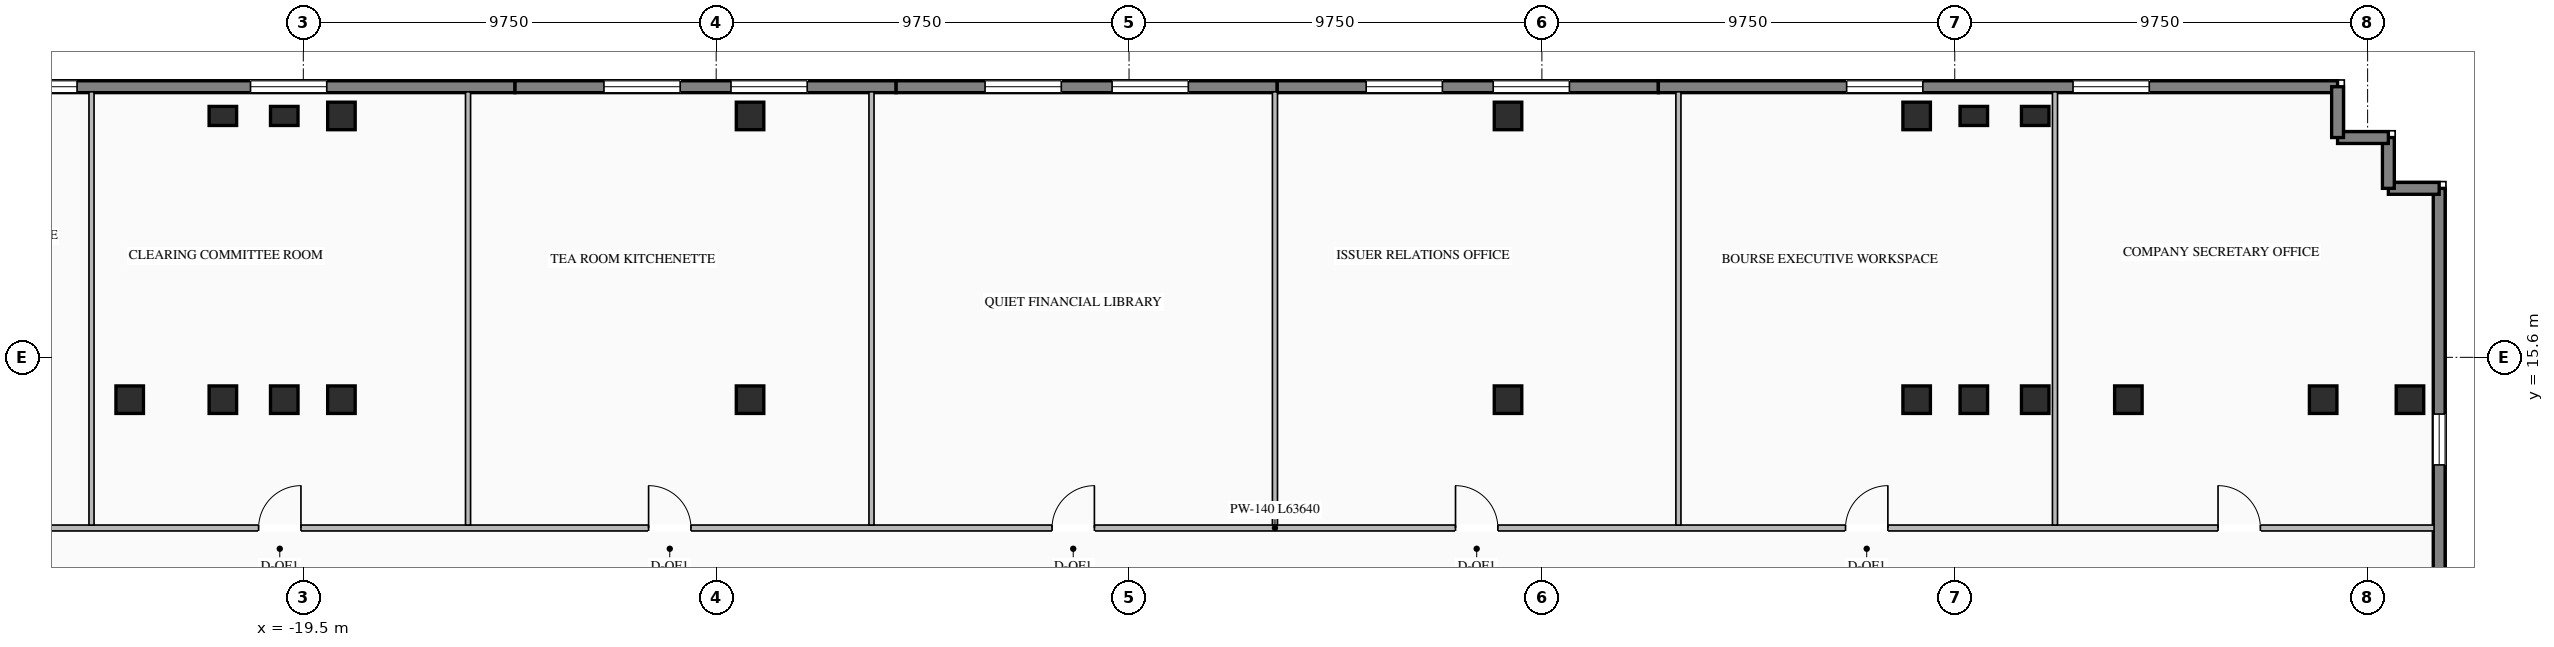
"""IFC4 building model, lengths in metres.
Left out: names, types, materials, properties, quantities, classifications, styles, units other than length and angle.
Written with IfcOpenShell. Run it as: python <this file> out.ifc"""

import sys

from ifc_helpers import new_model, si_unit, direction, frame, frame_2d, origin, origin_2d, place, context, subcontext, project, spatial, rectangle, i_section, extrude, element, fill, save


model = new_model("IFC4")
c1 = context("Model", 3, precision=1e-05, world=origin(), true_north=direction((0.0, 1.0)))
c2 = subcontext(c1, "Body", "Model", "MODEL_VIEW")
j1 = project(units=[si_unit("LENGTHUNIT", "METRE"), si_unit("PLANEANGLEUNIT", "RADIAN")], contexts=[c1])
p1 = place(None, origin())
s1 = spatial("IfcSite", under=j1, at=p1, CompositionType="ELEMENT")
p2 = place(p1, origin())
s2 = spatial("IfcBuilding", under=s1, at=p2, CompositionType="ELEMENT")
p3 = place(p2, frame((0.0, 0.0, 148.45)))
s3 = spatial("IfcBuildingStorey", under=s2, at=p3, CompositionType="ELEMENT", Elevation=148.45)
for number, where, z_axis, x_axis in (
    (1, (-21.4, 14.6, 0.0), (0.0, 0.0, 1.0), (1.0, 0.0, 0.0)),
    (2, (-19.95, 14.6, 0.0), (0.0, 0.0, 1.0), (1.0, 0.0, 0.0)),
    (3, (-18.6, 14.6, 0.0), (0.0, 0.0, 1.0), (1.0, 0.0, 0.0)),
    (4, (-8.95, 14.6, 0.0), (0.0, 0.0, 1.0), (1.0, 0.0, 0.0)),
    (5, (8.95, 14.6, 0.0), (0.0, 0.0, 1.0), (1.0, 0.0, 0.0)),
    (6, (18.6, 14.6, 0.0), (0.0, 0.0, 1.0), (1.0, 0.0, 0.0)),
    (7, (19.95, 14.6, 0.0), (0.0, 0.0, 1.0), (1.0, 0.0, 0.0)),
    (8, (21.4, 14.6, 0.0), (0.0, 0.0, 1.0), (1.0, 0.0, 0.0)),
    (9, (-23.6, 14.6, 0.0), (0.0, 0.0, 1.0), (1.0, 0.0, 0.0)),
    (10, (23.6, 14.6, 0.0), (0.0, 0.0, 1.0), (1.0, 0.0, 0.0)),
    (11, (28.2, 14.6, 0.0), (0.0, 0.0, 1.0), (1.0, 0.0, 0.0)),
    (12, (-18.6, 21.3, 0.0), (0.0, 0.0, 1.0), (1.0, 0.0, 0.0)),
    (13, (-8.95, 21.3, 0.0), (0.0, 0.0, 1.0), (1.0, 0.0, 0.0)),
    (14, (8.95, 21.3, 0.0), (0.0, 0.0, 1.0), (1.0, 0.0, 0.0)),
    (15, (18.6, 21.3, 0.0), (0.0, 0.0, 1.0), (1.0, 0.0, 0.0)),
    (16, (30.25, 14.6, 0.0), (0.0, 0.0, 1.0), (1.0, 0.0, 0.0)),
):
    element("IfcColumn", number, at=place(p3, frame(where, z_axis=z_axis, x_axis=x_axis)), inside=s3, PredefinedType="COLUMN", context=c2, shape_type="SweptSolid", body=[
        extrude(i_section(OverallWidth=0.65, OverallDepth=0.65, WebThickness=0.028, FlangeThickness=0.04, at=origin_2d()), origin(), (0.0, 0.0, 1.0), 3.45),
    ])
for number, where, z_axis, x_axis in (
    (17, (-21.4, 21.3, 0.0), (0.0, 0.0, 1.0), (1.0, 0.0, 0.0)),
    (18, (-19.95, 21.3, 0.0), (0.0, 0.0, 1.0), (1.0, 0.0, 0.0)),
    (19, (19.95, 21.3, 0.0), (0.0, 0.0, 1.0), (1.0, 0.0, 0.0)),
    (20, (21.4, 21.3, 0.0), (0.0, 0.0, 1.0), (1.0, 0.0, 0.0)),
):
    element("IfcColumn", number, at=place(p3, frame(where, z_axis=z_axis, x_axis=x_axis)), inside=s3, PredefinedType="PILASTER", context=c2, shape_type="SweptSolid", body=[
        extrude(rectangle(XDim=0.65, YDim=0.45, at=origin_2d()), origin(), (0.0, 0.0, 1.0), 3.45),
    ])
p4 = place(p3, frame((-30.54, 21.99, 0.0), z_axis=(0.0, 0.0, 1.0), x_axis=(1.0, 0.0, 0.0)))
e21 = element("IfcWall", 21, at=p4, inside=s3, PredefinedType="STANDARD", context=c2, shape_type="SweptSolid", body=[
    extrude(rectangle(XDim=16.04, YDim=0.28, at=frame_2d((8.02, 0.0))), origin(), (0.0, 0.0, 1.0), 3.25),
])
p5 = place(p4, frame((3.897, 0.0, 0.76)))
e22 = element("IfcOpeningElement", 22, at=p5, cuts=e21, PredefinedType="OPENING", context=c2, shape_type="SweptSolid", body=[
    extrude(rectangle(XDim=1.8, YDim=1.95, at=frame_2d((0.9, 0.975))), frame((0.0, 0.15, 0.0), z_axis=(0.0, -1.0, 0.0), x_axis=(1.0, 0.0, 0.0)), (0.0, 0.0, 1.0), 0.3),
])
p6 = place(p4, frame((9.793, 0.0, 0.76)))
e23 = element("IfcOpeningElement", 23, at=p6, cuts=e21, PredefinedType="OPENING", context=c2, shape_type="SweptSolid", body=[
    extrude(rectangle(XDim=1.8, YDim=1.95, at=frame_2d((0.9, 0.975))), frame((0.0, 0.15, 0.0), z_axis=(0.0, -1.0, 0.0), x_axis=(1.0, 0.0, 0.0)), (0.0, 0.0, 1.0), 0.3),
])
p7 = place(p3, frame((-14.5, 21.99, 0.0), z_axis=(0.0, 0.0, 1.0), x_axis=(1.0, 0.0, 0.0)))
e24 = element("IfcWall", 24, at=p7, inside=s3, PredefinedType="STANDARD", context=c2, shape_type="SweptSolid", body=[
    extrude(rectangle(XDim=9.0, YDim=0.28, at=frame_2d((4.5, 0.0))), origin(), (0.0, 0.0, 1.0), 3.25),
])
p8 = place(p7, frame((2.1, 0.0, 0.76)))
e25 = element("IfcOpeningElement", 25, at=p8, cuts=e24, PredefinedType="OPENING", context=c2, shape_type="SweptSolid", body=[
    extrude(rectangle(XDim=1.8, YDim=1.95, at=frame_2d((0.9, 0.975))), frame((0.0, 0.15, 0.0), z_axis=(0.0, -1.0, 0.0), x_axis=(1.0, 0.0, 0.0)), (0.0, 0.0, 1.0), 0.3),
])
p9 = place(p7, frame((5.1, 0.0, 0.76)))
e26 = element("IfcOpeningElement", 26, at=p9, cuts=e24, PredefinedType="OPENING", context=c2, shape_type="SweptSolid", body=[
    extrude(rectangle(XDim=1.8, YDim=1.95, at=frame_2d((0.9, 0.975))), frame((0.0, 0.15, 0.0), z_axis=(0.0, -1.0, 0.0), x_axis=(1.0, 0.0, 0.0)), (0.0, 0.0, 1.0), 0.3),
])
p10 = place(p3, frame((-5.5, 21.99, 0.0), z_axis=(0.0, 0.0, 1.0), x_axis=(1.0, 0.0, 0.0)))
e27 = element("IfcWall", 27, at=p10, inside=s3, PredefinedType="STANDARD", context=c2, shape_type="SweptSolid", body=[
    extrude(rectangle(XDim=9.0, YDim=0.28, at=frame_2d((4.5, 0.0))), origin(), (0.0, 0.0, 1.0), 3.25),
])
p11 = place(p10, frame((2.1, 0.0, 0.76)))
e28 = element("IfcOpeningElement", 28, at=p11, cuts=e27, PredefinedType="OPENING", context=c2, shape_type="SweptSolid", body=[
    extrude(rectangle(XDim=1.8, YDim=1.95, at=frame_2d((0.9, 0.975))), frame((0.0, 0.15, 0.0), z_axis=(0.0, -1.0, 0.0), x_axis=(1.0, 0.0, 0.0)), (0.0, 0.0, 1.0), 0.3),
])
p12 = place(p10, frame((5.1, 0.0, 0.76)))
e29 = element("IfcOpeningElement", 29, at=p12, cuts=e27, PredefinedType="OPENING", context=c2, shape_type="SweptSolid", body=[
    extrude(rectangle(XDim=1.8, YDim=1.95, at=frame_2d((0.9, 0.975))), frame((0.0, 0.15, 0.0), z_axis=(0.0, -1.0, 0.0), x_axis=(1.0, 0.0, 0.0)), (0.0, 0.0, 1.0), 0.3),
])
p13 = place(p3, frame((3.5, 21.99, 0.0), z_axis=(0.0, 0.0, 1.0), x_axis=(1.0, 0.0, 0.0)))
e30 = element("IfcWall", 30, at=p13, inside=s3, PredefinedType="STANDARD", context=c2, shape_type="SweptSolid", body=[
    extrude(rectangle(XDim=9.0, YDim=0.28, at=frame_2d((4.5, 0.0))), origin(), (0.0, 0.0, 1.0), 3.25),
])
p14 = place(p13, frame((2.1, 0.0, 0.76)))
e31 = element("IfcOpeningElement", 31, at=p14, cuts=e30, PredefinedType="OPENING", context=c2, shape_type="SweptSolid", body=[
    extrude(rectangle(XDim=1.8, YDim=1.95, at=frame_2d((0.9, 0.975))), frame((0.0, 0.15, 0.0), z_axis=(0.0, -1.0, 0.0), x_axis=(1.0, 0.0, 0.0)), (0.0, 0.0, 1.0), 0.3),
])
p15 = place(p13, frame((5.1, 0.0, 0.76)))
e32 = element("IfcOpeningElement", 32, at=p15, cuts=e30, PredefinedType="OPENING", context=c2, shape_type="SweptSolid", body=[
    extrude(rectangle(XDim=1.8, YDim=1.95, at=frame_2d((0.9, 0.975))), frame((0.0, 0.15, 0.0), z_axis=(0.0, -1.0, 0.0), x_axis=(1.0, 0.0, 0.0)), (0.0, 0.0, 1.0), 0.3),
])
p16 = place(p3, frame((12.5, 21.99, 0.0), z_axis=(0.0, 0.0, 1.0), x_axis=(1.0, 0.0, 0.0)))
e33 = element("IfcWall", 33, at=p16, inside=s3, PredefinedType="STANDARD", context=c2, shape_type="SweptSolid", body=[
    extrude(rectangle(XDim=16.04, YDim=0.28, at=frame_2d((8.02, 0.0))), origin(), (0.0, 0.0, 1.0), 3.25),
])
p17 = place(p16, frame((4.447, 0.0, 0.76)))
e34 = element("IfcOpeningElement", 34, at=p17, cuts=e33, PredefinedType="OPENING", context=c2, shape_type="SweptSolid", body=[
    extrude(rectangle(XDim=1.8, YDim=1.95, at=frame_2d((0.9, 0.975))), frame((0.0, 0.15, 0.0), z_axis=(0.0, -1.0, 0.0), x_axis=(1.0, 0.0, 0.0)), (0.0, 0.0, 1.0), 0.3),
])
p18 = place(p16, frame((9.793, 0.0, 0.76)))
e35 = element("IfcOpeningElement", 35, at=p18, cuts=e33, PredefinedType="OPENING", context=c2, shape_type="SweptSolid", body=[
    extrude(rectangle(XDim=1.8, YDim=1.95, at=frame_2d((0.9, 0.975))), frame((0.0, 0.15, 0.0), z_axis=(0.0, -1.0, 0.0), x_axis=(1.0, 0.0, 0.0)), (0.0, 0.0, 1.0), 0.3),
])
p19 = place(p3, frame((30.94, 19.59, 0.0), z_axis=(0.0, 0.0, 1.0), x_axis=(0.0, -1.0, 0.0)))
e36 = element("IfcWall", 36, at=p19, inside=s3, PredefinedType="STANDARD", context=c2, shape_type="SweptSolid", body=[
    extrude(rectangle(XDim=17.79, YDim=0.28, at=frame_2d((8.895, 0.0))), origin(), (0.0, 0.0, 1.0), 3.25),
])
p20 = place(p19, frame((5.33, 0.0, 0.76)))
e37 = element("IfcOpeningElement", 37, at=p20, cuts=e36, PredefinedType="OPENING", context=c2, shape_type="SweptSolid", body=[
    extrude(rectangle(XDim=1.2, YDim=1.95, at=frame_2d((0.6, 0.975))), frame((0.0, 0.15, 0.0), z_axis=(0.0, -1.0, 0.0), x_axis=(1.0, 0.0, 0.0)), (0.0, 0.0, 1.0), 0.3),
])
p21 = place(p19, frame((11.26, 0.0, 0.76)))
e38 = element("IfcOpeningElement", 38, at=p21, cuts=e36, PredefinedType="OPENING", context=c2, shape_type="SweptSolid", body=[
    extrude(rectangle(XDim=1.2, YDim=1.95, at=frame_2d((0.6, 0.975))), frame((0.0, 0.15, 0.0), z_axis=(0.0, -1.0, 0.0), x_axis=(1.0, 0.0, 0.0)), (0.0, 0.0, 1.0), 0.3),
])
for number, where, z_axis, x_axis in (
    (39, (30.94, 19.59, 0.0), (0.0, 0.0, 1.0), (-1.0, 0.0, 0.0)),
    (40, (29.74, 19.59, 0.0), (0.0, 0.0, 1.0), (0.0, 1.0, 0.0)),
    (41, (29.74, 20.79, 0.0), (0.0, 0.0, 1.0), (-1.0, 0.0, 0.0)),
    (42, (28.54, 20.79, 0.0), (0.0, 0.0, 1.0), (0.0, 1.0, 0.0)),
):
    element("IfcWall", number, at=place(p3, frame(where, z_axis=z_axis, x_axis=x_axis)), inside=s3, PredefinedType="STANDARD", context=c2, shape_type="SweptSolid", body=[
        extrude(rectangle(XDim=1.2, YDim=0.28, at=frame_2d((0.6, 0.0))), origin(), (0.0, 0.0, 1.0), 3.25),
    ])
p22 = place(p3, frame((-32.82, 11.57, 0.0), z_axis=(0.0, 0.0, 1.0), x_axis=(1.0, 0.0, 0.0)))
e43 = element("IfcWall", 43, at=p22, inside=s3, PredefinedType="STANDARD", context=c2, shape_type="SweptSolid", body=[
    extrude(rectangle(XDim=63.64, YDim=0.14, at=frame_2d((31.82, 0.0))), origin(), (0.0, 0.0, 1.0), 2.795),
])
p23 = place(p22, frame((3.785, 0.0, 0.0)))
e44 = element("IfcOpeningElement", 44, at=p23, cuts=e43, PredefinedType="OPENING", context=c2, shape_type="SweptSolid", body=[
    extrude(rectangle(XDim=1.0, YDim=2.08, at=frame_2d((0.5, 1.04))), frame((0.0, 0.08, 0.0), z_axis=(0.0, -1.0, 0.0), x_axis=(1.0, 0.0, 0.0)), (0.0, 0.0, 1.0), 0.16),
])
p24 = place(p22, frame((12.264, 0.0, 0.0)))
e45 = element("IfcOpeningElement", 45, at=p24, cuts=e43, PredefinedType="OPENING", context=c2, shape_type="SweptSolid", body=[
    extrude(rectangle(XDim=1.0, YDim=2.08, at=frame_2d((0.5, 1.04))), frame((0.0, 0.08, 0.0), z_axis=(0.0, -1.0, 0.0), x_axis=(1.0, 0.0, 0.0)), (0.0, 0.0, 1.0), 0.16),
])
p25 = place(p22, frame((21.474, 0.0, 0.0)))
e46 = element("IfcOpeningElement", 46, at=p25, cuts=e43, PredefinedType="OPENING", context=c2, shape_type="SweptSolid", body=[
    extrude(rectangle(XDim=1.0, YDim=2.08, at=frame_2d((0.5, 1.04))), frame((0.0, 0.08, 0.0), z_axis=(0.0, -1.0, 0.0), x_axis=(1.0, 0.0, 0.0)), (0.0, 0.0, 1.0), 0.16),
])
p26 = place(p22, frame((31.002, 0.0, 0.0)))
e47 = element("IfcOpeningElement", 47, at=p26, cuts=e43, PredefinedType="OPENING", context=c2, shape_type="SweptSolid", body=[
    extrude(rectangle(XDim=1.0, YDim=2.08, at=frame_2d((0.5, 1.04))), frame((0.0, 0.08, 0.0), z_axis=(0.0, -1.0, 0.0), x_axis=(1.0, 0.0, 0.0)), (0.0, 0.0, 1.0), 0.16),
])
p27 = place(p22, frame((40.53, 0.0, 0.0)))
e48 = element("IfcOpeningElement", 48, at=p27, cuts=e43, PredefinedType="OPENING", context=c2, shape_type="SweptSolid", body=[
    extrude(rectangle(XDim=1.0, YDim=2.08, at=frame_2d((0.5, 1.04))), frame((0.0, 0.08, 0.0), z_axis=(0.0, -1.0, 0.0), x_axis=(1.0, 0.0, 0.0)), (0.0, 0.0, 1.0), 0.16),
])
p28 = place(p22, frame((49.74, 0.0, 0.0)))
e49 = element("IfcOpeningElement", 49, at=p28, cuts=e43, PredefinedType="OPENING", context=c2, shape_type="SweptSolid", body=[
    extrude(rectangle(XDim=1.0, YDim=2.08, at=frame_2d((0.5, 1.04))), frame((0.0, 0.08, 0.0), z_axis=(0.0, -1.0, 0.0), x_axis=(1.0, 0.0, 0.0)), (0.0, 0.0, 1.0), 0.16),
])
p29 = place(p22, frame((58.538, 0.0, 0.0)))
e50 = element("IfcOpeningElement", 50, at=p29, cuts=e43, PredefinedType="OPENING", context=c2, shape_type="SweptSolid", body=[
    extrude(rectangle(XDim=1.0, YDim=2.08, at=frame_2d((0.5, 1.04))), frame((0.0, 0.08, 0.0), z_axis=(0.0, -1.0, 0.0), x_axis=(1.0, 0.0, 0.0)), (0.0, 0.0, 1.0), 0.16),
])
for number, where, z_axis, x_axis in (
    (51, (-24.502, 11.64, 0.0), (0.0, 0.0, 1.0), (0.0, 1.0, 0.0)),
    (52, (-15.61, 11.64, 0.0), (0.0, 0.0, 1.0), (0.0, 1.0, 0.0)),
    (53, (-6.082, 11.64, 0.0), (0.0, 0.0, 1.0), (0.0, 1.0, 0.0)),
    (54, (3.446, 11.64, 0.0), (0.0, 0.0, 1.0), (0.0, 1.0, 0.0)),
    (55, (12.974, 11.64, 0.0), (0.0, 0.0, 1.0), (0.0, 1.0, 0.0)),
    (56, (21.867, 11.64, 0.0), (0.0, 0.0, 1.0), (0.0, 1.0, 0.0)),
):
    element("IfcWall", number, at=place(p3, frame(where, z_axis=z_axis, x_axis=x_axis)), inside=s3, PredefinedType="STANDARD", context=c2, shape_type="SweptSolid", body=[
        extrude(rectangle(XDim=10.23, YDim=0.12, at=frame_2d((5.115, 0.0))), origin(), (0.0, 0.0, 1.0), 3.25),
    ])
p30 = place(p5, origin())
e57 = element("IfcWindow", 57, at=p30, inside=s3, PartitioningType="SINGLE_PANEL", PredefinedType="WINDOW", context=c2, shape_type="SweptSolid", body=[
    extrude(rectangle(XDim=1.8, YDim=1.95, at=frame_2d((0.9, 0.975))), frame((0.0, 0.03, 0.0), z_axis=(0.0, -1.0, 0.0), x_axis=(1.0, 0.0, 0.0)), (0.0, 0.0, 1.0), 0.06),
])
fill(e22, e57)
p31 = place(p6, origin())
e58 = element("IfcWindow", 58, at=p31, inside=s3, PartitioningType="SINGLE_PANEL", PredefinedType="WINDOW", context=c2, shape_type="SweptSolid", body=[
    extrude(rectangle(XDim=1.8, YDim=1.95, at=frame_2d((0.9, 0.975))), frame((0.0, 0.03, 0.0), z_axis=(0.0, -1.0, 0.0), x_axis=(1.0, 0.0, 0.0)), (0.0, 0.0, 1.0), 0.06),
])
fill(e23, e58)
p32 = place(p8, origin())
e59 = element("IfcWindow", 59, at=p32, inside=s3, PartitioningType="SINGLE_PANEL", PredefinedType="WINDOW", context=c2, shape_type="SweptSolid", body=[
    extrude(rectangle(XDim=1.8, YDim=1.95, at=frame_2d((0.9, 0.975))), frame((0.0, 0.03, 0.0), z_axis=(0.0, -1.0, 0.0), x_axis=(1.0, 0.0, 0.0)), (0.0, 0.0, 1.0), 0.06),
])
fill(e25, e59)
p33 = place(p9, origin())
e60 = element("IfcWindow", 60, at=p33, inside=s3, PartitioningType="SINGLE_PANEL", PredefinedType="WINDOW", context=c2, shape_type="SweptSolid", body=[
    extrude(rectangle(XDim=1.8, YDim=1.95, at=frame_2d((0.9, 0.975))), frame((0.0, 0.03, 0.0), z_axis=(0.0, -1.0, 0.0), x_axis=(1.0, 0.0, 0.0)), (0.0, 0.0, 1.0), 0.06),
])
fill(e26, e60)
p34 = place(p11, origin())
e61 = element("IfcWindow", 61, at=p34, inside=s3, PartitioningType="SINGLE_PANEL", PredefinedType="WINDOW", context=c2, shape_type="SweptSolid", body=[
    extrude(rectangle(XDim=1.8, YDim=1.95, at=frame_2d((0.9, 0.975))), frame((0.0, 0.03, 0.0), z_axis=(0.0, -1.0, 0.0), x_axis=(1.0, 0.0, 0.0)), (0.0, 0.0, 1.0), 0.06),
])
fill(e28, e61)
p35 = place(p12, origin())
e62 = element("IfcWindow", 62, at=p35, inside=s3, PartitioningType="SINGLE_PANEL", PredefinedType="WINDOW", context=c2, shape_type="SweptSolid", body=[
    extrude(rectangle(XDim=1.8, YDim=1.95, at=frame_2d((0.9, 0.975))), frame((0.0, 0.03, 0.0), z_axis=(0.0, -1.0, 0.0), x_axis=(1.0, 0.0, 0.0)), (0.0, 0.0, 1.0), 0.06),
])
fill(e29, e62)
p36 = place(p14, origin())
e63 = element("IfcWindow", 63, at=p36, inside=s3, PartitioningType="SINGLE_PANEL", PredefinedType="WINDOW", context=c2, shape_type="SweptSolid", body=[
    extrude(rectangle(XDim=1.8, YDim=1.95, at=frame_2d((0.9, 0.975))), frame((0.0, 0.03, 0.0), z_axis=(0.0, -1.0, 0.0), x_axis=(1.0, 0.0, 0.0)), (0.0, 0.0, 1.0), 0.06),
])
fill(e31, e63)
p37 = place(p15, origin())
e64 = element("IfcWindow", 64, at=p37, inside=s3, PartitioningType="SINGLE_PANEL", PredefinedType="WINDOW", context=c2, shape_type="SweptSolid", body=[
    extrude(rectangle(XDim=1.8, YDim=1.95, at=frame_2d((0.9, 0.975))), frame((0.0, 0.03, 0.0), z_axis=(0.0, -1.0, 0.0), x_axis=(1.0, 0.0, 0.0)), (0.0, 0.0, 1.0), 0.06),
])
fill(e32, e64)
p38 = place(p17, origin())
e65 = element("IfcWindow", 65, at=p38, inside=s3, PartitioningType="SINGLE_PANEL", PredefinedType="WINDOW", context=c2, shape_type="SweptSolid", body=[
    extrude(rectangle(XDim=1.8, YDim=1.95, at=frame_2d((0.9, 0.975))), frame((0.0, 0.03, 0.0), z_axis=(0.0, -1.0, 0.0), x_axis=(1.0, 0.0, 0.0)), (0.0, 0.0, 1.0), 0.06),
])
fill(e34, e65)
p39 = place(p18, origin())
e66 = element("IfcWindow", 66, at=p39, inside=s3, PartitioningType="SINGLE_PANEL", PredefinedType="WINDOW", context=c2, shape_type="SweptSolid", body=[
    extrude(rectangle(XDim=1.8, YDim=1.95, at=frame_2d((0.9, 0.975))), frame((0.0, 0.03, 0.0), z_axis=(0.0, -1.0, 0.0), x_axis=(1.0, 0.0, 0.0)), (0.0, 0.0, 1.0), 0.06),
])
fill(e35, e66)
p40 = place(p20, origin())
e67 = element("IfcWindow", 67, at=p40, inside=s3, PartitioningType="SINGLE_PANEL", PredefinedType="WINDOW", context=c2, shape_type="SweptSolid", body=[
    extrude(rectangle(XDim=1.2, YDim=1.95, at=frame_2d((0.6, 0.975))), frame((0.0, 0.03, 0.0), z_axis=(0.0, -1.0, 0.0), x_axis=(1.0, 0.0, 0.0)), (0.0, 0.0, 1.0), 0.06),
])
fill(e37, e67)
p41 = place(p24, origin())
e68 = element("IfcDoor", 68, at=p41, inside=s3, OperationType="SINGLE_SWING_RIGHT", PredefinedType="DOOR", context=c2, shape_type="SweptSolid", body=[
    extrude(rectangle(XDim=1.0, YDim=2.08, at=frame_2d((0.5, 1.04))), frame((0.0, 0.025, 0.0), z_axis=(0.0, -1.0, 0.0), x_axis=(1.0, 0.0, 0.0)), (0.0, 0.0, 1.0), 0.05),
])
fill(e45, e68)
p42 = place(p25, origin())
e69 = element("IfcDoor", 69, at=p42, inside=s3, OperationType="SINGLE_SWING_LEFT", PredefinedType="DOOR", context=c2, shape_type="SweptSolid", body=[
    extrude(rectangle(XDim=1.0, YDim=2.08, at=frame_2d((0.5, 1.04))), frame((0.0, 0.025, 0.0), z_axis=(0.0, -1.0, 0.0), x_axis=(1.0, 0.0, 0.0)), (0.0, 0.0, 1.0), 0.05),
])
fill(e46, e69)
p43 = place(p26, origin())
e70 = element("IfcDoor", 70, at=p43, inside=s3, OperationType="SINGLE_SWING_RIGHT", PredefinedType="DOOR", context=c2, shape_type="SweptSolid", body=[
    extrude(rectangle(XDim=1.0, YDim=2.08, at=frame_2d((0.5, 1.04))), frame((0.0, 0.025, 0.0), z_axis=(0.0, -1.0, 0.0), x_axis=(1.0, 0.0, 0.0)), (0.0, 0.0, 1.0), 0.05),
])
fill(e47, e70)
p44 = place(p27, origin())
e71 = element("IfcDoor", 71, at=p44, inside=s3, OperationType="SINGLE_SWING_LEFT", PredefinedType="DOOR", context=c2, shape_type="SweptSolid", body=[
    extrude(rectangle(XDim=1.0, YDim=2.08, at=frame_2d((0.5, 1.04))), frame((0.0, 0.025, 0.0), z_axis=(0.0, -1.0, 0.0), x_axis=(1.0, 0.0, 0.0)), (0.0, 0.0, 1.0), 0.05),
])
fill(e48, e71)
p45 = place(p28, origin())
e72 = element("IfcDoor", 72, at=p45, inside=s3, OperationType="SINGLE_SWING_RIGHT", PredefinedType="DOOR", context=c2, shape_type="SweptSolid", body=[
    extrude(rectangle(XDim=1.0, YDim=2.08, at=frame_2d((0.5, 1.04))), frame((0.0, 0.025, 0.0), z_axis=(0.0, -1.0, 0.0), x_axis=(1.0, 0.0, 0.0)), (0.0, 0.0, 1.0), 0.05),
])
fill(e49, e72)
p46 = place(p29, origin())
e73 = element("IfcDoor", 73, at=p46, inside=s3, OperationType="SINGLE_SWING_LEFT", PredefinedType="DOOR", context=c2, shape_type="SweptSolid", body=[
    extrude(rectangle(XDim=1.0, YDim=2.08, at=frame_2d((0.5, 1.04))), frame((0.0, 0.025, 0.0), z_axis=(0.0, -1.0, 0.0), x_axis=(1.0, 0.0, 0.0)), (0.0, 0.0, 1.0), 0.05),
])
fill(e50, e73)
save(model, sys.argv[1])
